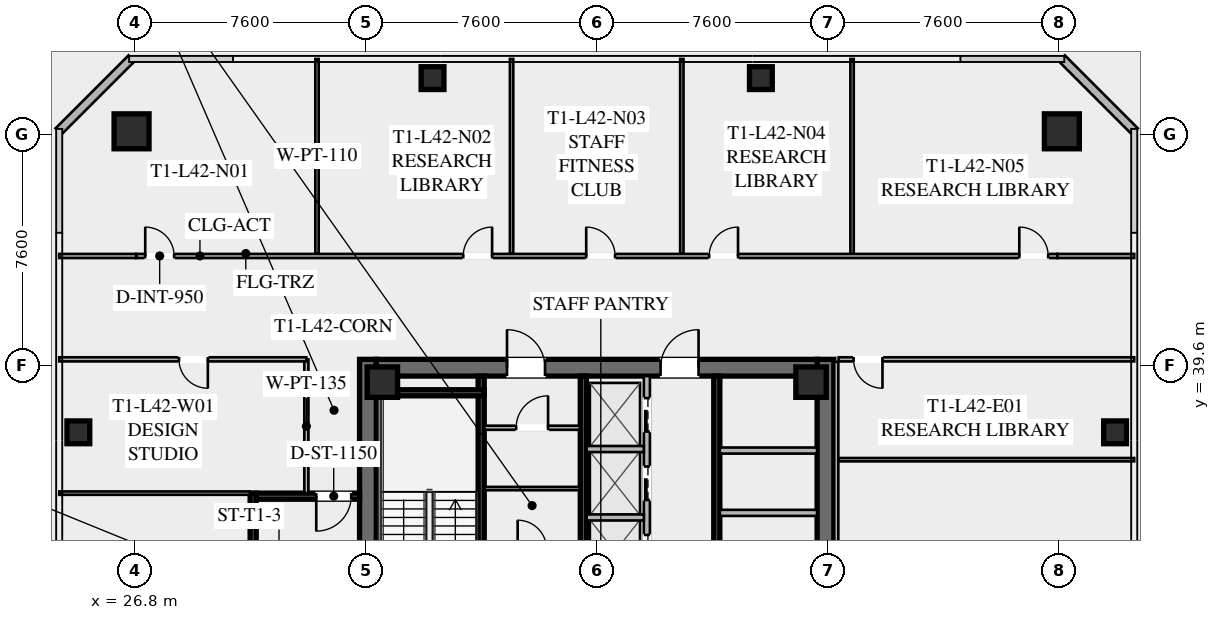
"""IFC4 building model, lengths in metres.
Left out: names, types, materials, properties, quantities, classifications, styles, units other than length and angle.
Written with IfcOpenShell. Run it as: python <this file> out.ifc"""

import sys

from ifc_helpers import new_model, si_unit, direction, frame, frame_2d, origin, origin_2d, place, context, subcontext, project, spatial, rectangle, hollow_rectangle, extrude, element, fill, save


model = new_model("IFC4")
c1 = context("Model", 3, precision=1e-05, world=origin(), true_north=direction((0.0, 1.0)))
c2 = subcontext(c1, "Body", "Model", "MODEL_VIEW")
j1 = project(units=[si_unit("LENGTHUNIT", "METRE"), si_unit("PLANEANGLEUNIT", "RADIAN")], contexts=[c1])
p1 = place(None, origin())
s1 = spatial("IfcSite", under=j1, at=p1, CompositionType="ELEMENT")
p2 = place(p1, origin())
s2 = spatial("IfcBuilding", under=s1, at=p2, CompositionType="ELEMENT")
p3 = place(p2, frame((0.0, 0.0, 157.0)))
s3 = spatial("IfcBuildingStorey", under=s2, at=p3, CompositionType="ELEMENT", Elevation=157.0)
for number, where, z_axis, x_axis in (
    (1, (34.475, 24.2, 0.0), (0.0, 0.0, 1.0), (0.0, 1.0, 0.0)),
    (2, (49.525, 39.8, 0.0), (0.0, 0.0, 1.0), (0.0, -1.0, 0.0)),
):
    element("IfcWall", number, at=place(p3, frame(where, z_axis=z_axis, x_axis=x_axis)), inside=s3, PredefinedType="SHEAR", context=c2, shape_type="SweptSolid", body=[
        extrude(rectangle(XDim=15.6, YDim=0.55, at=frame_2d((7.8, 0.0))), origin(), (0.0, 0.0, 1.0), 3.55),
    ])
p4 = place(p3, frame((34.75, 39.525, 0.0), z_axis=(0.0, 0.0, 1.0), x_axis=(1.0, 0.0, 0.0)))
e3 = element("IfcWall", 3, at=p4, inside=s3, PredefinedType="SHEAR", context=c2, shape_type="SweptSolid", body=[
    extrude(rectangle(XDim=14.5, YDim=0.55, at=frame_2d((7.25, 0.0))), origin(), (0.0, 0.0, 1.0), 3.55),
])
p5 = place(p4, frame((4.3, 0.0, 0.0)))
e4 = element("IfcOpeningElement", 4, at=p5, cuts=e3, PredefinedType="OPENING", context=c2, shape_type="SweptSolid", body=[
    extrude(rectangle(XDim=1.25, YDim=2.25, at=frame_2d((0.625, 1.125))), frame((0.0, 0.285, 0.0), z_axis=(0.0, -1.0, 0.0), x_axis=(1.0, 0.0, 0.0)), (0.0, 0.0, 1.0), 0.57),
])
p6 = place(p4, frame((9.35, 0.0, 0.0)))
e5 = element("IfcOpeningElement", 5, at=p6, cuts=e3, PredefinedType="OPENING", context=c2, shape_type="SweptSolid", body=[
    extrude(rectangle(XDim=1.25, YDim=2.25, at=frame_2d((0.625, 1.125))), frame((0.0, 0.285, 0.0), z_axis=(0.0, -1.0, 0.0), x_axis=(1.0, 0.0, 0.0)), (0.0, 0.0, 1.0), 0.57),
])
for number, where, z_axis, x_axis in (
    (6, (49.05, 39.05, 0.0), (0.0, 0.0, 1.0), (1.0, 0.0, 0.0)),
    (7, (34.95, 39.05, 0.0), (0.0, 0.0, 1.0), (1.0, 0.0, 0.0)),
):
    element("IfcColumn", number, at=place(p3, frame(where, z_axis=z_axis, x_axis=x_axis)), inside=s3, PredefinedType="COLUMN", context=c2, shape_type="SweptSolid", body=[
        extrude(hollow_rectangle(XDim=1.0, YDim=1.0, WallThickness=0.04, at=origin_2d()), origin(), (0.0, 0.0, 1.0), 3.37),
    ])
for number, where, z_axis, x_axis in (
    (8, (57.3, 47.3, -0.175), (0.0, 0.0, 1.0), (1.0, 0.0, 0.0)),
    (9, (26.7, 47.3, -0.175), (0.0, 0.0, 1.0), (1.0, 0.0, 0.0)),
):
    element("IfcColumn", number, at=place(p3, frame(where, z_axis=z_axis, x_axis=x_axis)), inside=s3, PredefinedType="COLUMN", context=c2, shape_type="SweptSolid", body=[
        extrude(hollow_rectangle(XDim=1.15, YDim=1.15, WallThickness=0.045, at=origin_2d()), origin(), (0.0, 0.0, 1.0), 3.545),
    ])
for number, where, z_axis, x_axis in (
    (10, (59.05, 37.4, -0.175), (0.0, 0.0, 1.0), (1.0, 0.0, 0.0)),
    (11, (47.4, 49.05, -0.175), (0.0, 0.0, 1.0), (1.0, 0.0, 0.0)),
    (12, (36.6, 49.05, -0.175), (0.0, 0.0, 1.0), (1.0, 0.0, 0.0)),
    (13, (24.95, 37.4, -0.175), (0.0, 0.0, 1.0), (1.0, 0.0, 0.0)),
):
    element("IfcColumn", number, at=place(p3, frame(where, z_axis=z_axis, x_axis=x_axis)), inside=s3, PredefinedType="COLUMN", context=c2, shape_type="SweptSolid", body=[
        extrude(hollow_rectangle(XDim=0.75, YDim=0.75, WallThickness=0.032, at=origin_2d()), origin(), (0.0, 0.0, 1.0), 3.545),
    ])
for number, where, z_axis, x_axis in (
    (14, (24.3, 47.3, 0.0), (0.0, 0.0, 1.0), (0.707, 0.707, 0.0)),
    (15, (57.3, 49.7, 0.0), (0.0, 0.0, 1.0), (0.707, -0.707, 0.0)),
):
    element("IfcWall", number, at=place(p3, frame(where, z_axis=z_axis, x_axis=x_axis)), inside=s3, PredefinedType="SOLIDWALL", context=c2, shape_type="SweptSolid", body=[
        extrude(rectangle(XDim=3.394, YDim=0.28, at=frame_2d((1.697, 0.0))), origin(), (0.0, 0.0, 1.0), 3.37),
    ])
p7 = place(p3, frame((38.2, 31.2, 0.0), z_axis=(0.0, 0.0, 1.0), x_axis=(0.0, 1.0, 0.0)))
e16 = element("IfcWall", 16, at=p7, inside=s3, PredefinedType="SHEAR", context=c2, shape_type="SweptSolid", body=[
    extrude(rectangle(XDim=8.05, YDim=0.2, at=frame_2d((4.025, 0.0))), origin(), (0.0, 0.0, 1.0), 3.37),
])
p8 = place(p7, frame((0.45, 0.0, 0.0)))
e17 = element("IfcOpeningElement", 17, at=p8, cuts=e16, PredefinedType="OPENING", context=c2, shape_type="SweptSolid", body=[
    extrude(rectangle(XDim=1.15, YDim=2.2, at=frame_2d((0.575, 1.1))), frame((0.0, 0.11, 0.0), z_axis=(0.0, -1.0, 0.0), x_axis=(1.0, 0.0, 0.0)), (0.0, 0.0, 1.0), 0.22),
])
p9 = place(p3, frame((34.75, 38.7, 0.0), z_axis=(0.0, 0.0, 1.0), x_axis=(1.0, 0.0, 0.0)))
e18 = element("IfcWall", 18, at=p9, inside=s3, PredefinedType="SHEAR", context=c2, shape_type="SweptSolid", body=[
    extrude(rectangle(XDim=3.55, YDim=0.2, at=frame_2d((1.775, 0.0))), origin(), (0.0, 0.0, 1.0), 3.37),
])
p10 = place(p3, frame((41.56, 24.75, 0.0), z_axis=(0.0, 0.0, 1.0), x_axis=(0.0, 1.0, 0.0)))
e19 = element("IfcWall", 19, at=p10, inside=s3, PredefinedType="SHEAR", context=c2, shape_type="SweptSolid", body=[
    extrude(rectangle(XDim=14.5, YDim=0.2, at=frame_2d((7.25, 0.0))), origin(), (0.0, 0.0, 1.0), 3.37),
])
p11 = place(p3, frame((45.95, 39.25, 0.0), z_axis=(0.0, 0.0, 1.0), x_axis=(0.0, -1.0, 0.0)))
e20 = element("IfcWall", 20, at=p11, inside=s3, PredefinedType="SHEAR", context=c2, shape_type="SweptSolid", body=[
    extrude(rectangle(XDim=6.45, YDim=0.2, at=frame_2d((3.225, 0.0))), origin(), (0.0, 0.0, 1.0), 3.37),
])
for number, where, z_axis, x_axis in (
    (21, (46.05, 34.75, 0.0), (0.0, 0.0, 1.0), (1.0, 0.0, 0.0)),
    (22, (46.05, 36.8, 0.0), (0.0, 0.0, 1.0), (1.0, 0.0, 0.0)),
):
    element("IfcWall", number, at=place(p3, frame(where, z_axis=z_axis, x_axis=x_axis)), inside=s3, PredefinedType="SOLIDWALL", context=c2, shape_type="SweptSolid", body=[
        extrude(rectangle(XDim=3.2, YDim=0.2, at=frame_2d((1.6, 0.0))), origin(), (0.0, 0.0, 1.0), 3.37),
    ])
p12 = place(p3, frame((38.3, 37.55, 0.0), z_axis=(0.0, 0.0, 1.0), x_axis=(1.0, 0.0, 0.0)))
e23 = element("IfcWall", 23, at=p12, inside=s3, PredefinedType="PARTITIONING", context=c2, shape_type="SweptSolid", body=[
    extrude(rectangle(XDim=3.15, YDim=0.135, at=frame_2d((1.575, 0.0))), origin(), (0.0, 0.0, 1.0), 2.723),
])
p13 = place(p12, frame((1.05, 0.0, 0.0)))
e24 = element("IfcOpeningElement", 24, at=p13, cuts=e23, PredefinedType="OPENING", context=c2, shape_type="SweptSolid", body=[
    extrude(rectangle(XDim=1.05, YDim=2.2, at=frame_2d((0.525, 1.1))), frame((0.0, 0.077, 0.0), z_axis=(0.0, -1.0, 0.0), x_axis=(1.0, 0.0, 0.0)), (0.0, 0.0, 1.0), 0.155),
])
p14 = place(p3, frame((38.3, 35.55, 0.0), z_axis=(0.0, 0.0, 1.0), x_axis=(1.0, 0.0, 0.0)))
e25 = element("IfcWall", 25, at=p14, inside=s3, PredefinedType="PARTITIONING", context=c2, shape_type="SweptSolid", body=[
    extrude(rectangle(XDim=3.15, YDim=0.11, at=frame_2d((1.575, 0.0))), origin(), (0.0, 0.0, 1.0), 2.723),
])
p15 = place(p3, frame((43.65, 32.35, 0.0), z_axis=(0.0, 0.0, 1.0), x_axis=(0.0, 1.0, 0.0)))
e26 = element("IfcWall", 26, at=p15, inside=s3, PredefinedType="SOLIDWALL", context=c2, shape_type="SweptSolid", body=[
    extrude(rectangle(XDim=6.9, YDim=0.2, at=frame_2d((3.45, 0.0))), origin(), (0.0, 0.0, 1.0), 3.37),
])
p16 = place(p15, frame((0.575, 0.0, 0.0)))
e27 = element("IfcOpeningElement", 27, at=p16, cuts=e26, PredefinedType="OPENING", context=c2, shape_type="SweptSolid", body=[
    extrude(rectangle(XDim=1.1, YDim=2.2, at=frame_2d((0.55, 1.1))), frame((0.0, 0.11, 0.0), z_axis=(0.0, -1.0, 0.0), x_axis=(1.0, 0.0, 0.0)), (0.0, 0.0, 1.0), 0.22),
])
p17 = place(p15, frame((2.825, 0.0, 0.0)))
e28 = element("IfcOpeningElement", 28, at=p17, cuts=e26, PredefinedType="OPENING", context=c2, shape_type="SweptSolid", body=[
    extrude(rectangle(XDim=1.1, YDim=2.2, at=frame_2d((0.55, 1.1))), frame((0.0, 0.11, 0.0), z_axis=(0.0, -1.0, 0.0), x_axis=(1.0, 0.0, 0.0)), (0.0, 0.0, 1.0), 0.22),
])
p18 = place(p15, frame((5.075, 0.0, 0.0)))
e29 = element("IfcOpeningElement", 29, at=p18, cuts=e26, PredefinedType="OPENING", context=c2, shape_type="SweptSolid", body=[
    extrude(rectangle(XDim=1.1, YDim=2.2, at=frame_2d((0.55, 1.1))), frame((0.0, 0.11, 0.0), z_axis=(0.0, -1.0, 0.0), x_axis=(1.0, 0.0, 0.0)), (0.0, 0.0, 1.0), 0.22),
])
for number, where, z_axis, x_axis in (
    (30, (41.67, 34.6, 0.0), (0.0, 0.0, 1.0), (1.0, 0.0, 0.0)),
    (31, (41.67, 36.85, 0.0), (0.0, 0.0, 1.0), (1.0, 0.0, 0.0)),
):
    element("IfcWall", number, at=place(p3, frame(where, z_axis=z_axis, x_axis=x_axis)), inside=s3, PredefinedType="SOLIDWALL", context=c2, shape_type="SweptSolid", body=[
        extrude(rectangle(XDim=1.88, YDim=0.2, at=frame_2d((0.94, 0.0))), origin(), (0.0, 0.0, 1.0), 3.37),
    ])
p19 = place(p3, frame((30.7, 28.6, 0.0), z_axis=(0.0, 0.0, 1.0), x_axis=(0.0, 1.0, 0.0)))
e32 = element("IfcWall", 32, at=p19, inside=s3, PredefinedType="SHEAR", context=c2, shape_type="SweptSolid", body=[
    extrude(rectangle(XDim=6.8, YDim=0.2, at=frame_2d((3.4, 0.0))), origin(), (0.0, 0.0, 1.0), 3.37),
])
p20 = place(p3, frame((34.2, 35.3, 0.0), z_axis=(0.0, 0.0, 1.0), x_axis=(-1.0, 0.0, 0.0)))
e33 = element("IfcWall", 33, at=p20, inside=s3, PredefinedType="SHEAR", context=c2, shape_type="SweptSolid", body=[
    extrude(rectangle(XDim=3.4, YDim=0.2, at=frame_2d((1.7, 0.0))), origin(), (0.0, 0.0, 1.0), 3.37),
])
p21 = place(p20, frame((0.275, 0.0, 0.0)))
e34 = element("IfcOpeningElement", 34, at=p21, cuts=e33, PredefinedType="OPENING", context=c2, shape_type="SweptSolid", body=[
    extrude(rectangle(XDim=1.15, YDim=2.2, at=frame_2d((0.575, 1.1))), frame((0.0, 0.11, 0.0), z_axis=(0.0, -1.0, 0.0), x_axis=(1.0, 0.0, 0.0)), (0.0, 0.0, 1.0), 0.22),
])
p22 = place(p3, frame((32.45, 35.4, 0.0), z_axis=(0.0, 0.0, 1.0), x_axis=(0.0, 1.0, 0.0)))
e35 = element("IfcWall", 35, at=p22, inside=s3, PredefinedType="PARTITIONING", context=c2, shape_type="SweptSolid", body=[
    extrude(rectangle(XDim=4.4, YDim=0.135, at=frame_2d((2.2, 0.0))), origin(), (0.0, 0.0, 1.0), 2.723),
])
p23 = place(p3, frame((26.85, 43.2, 0.0), z_axis=(0.0, 0.0, 1.0), x_axis=(1.0, 0.0, 0.0)))
e36 = element("IfcWall", 36, at=p23, inside=s3, PredefinedType="PARTITIONING", context=c2, shape_type="SweptSolid", body=[
    extrude(rectangle(XDim=30.3, YDim=0.135, at=frame_2d((15.15, 0.0))), origin(), (0.0, 0.0, 1.0), 2.723),
])
p24 = place(p23, frame((0.3, 0.0, 0.0)))
e37 = element("IfcOpeningElement", 37, at=p24, cuts=e36, PredefinedType="OPENING", context=c2, shape_type="SweptSolid", body=[
    extrude(rectangle(XDim=0.95, YDim=2.05, at=frame_2d((0.475, 1.025))), frame((0.0, 0.077, 0.0), z_axis=(0.0, -1.0, 0.0), x_axis=(1.0, 0.0, 0.0)), (0.0, 0.0, 1.0), 0.155),
])
p25 = place(p23, frame((10.76, 0.0, 0.0)))
e38 = element("IfcOpeningElement", 38, at=p25, cuts=e36, PredefinedType="OPENING", context=c2, shape_type="SweptSolid", body=[
    extrude(rectangle(XDim=0.95, YDim=2.05, at=frame_2d((0.475, 1.025))), frame((0.0, 0.077, 0.0), z_axis=(0.0, -1.0, 0.0), x_axis=(1.0, 0.0, 0.0)), (0.0, 0.0, 1.0), 0.155),
])
p26 = place(p23, frame((14.805, 0.0, 0.0)))
e39 = element("IfcOpeningElement", 39, at=p26, cuts=e36, PredefinedType="OPENING", context=c2, shape_type="SweptSolid", body=[
    extrude(rectangle(XDim=0.95, YDim=2.05, at=frame_2d((0.475, 1.025))), frame((0.0, 0.077, 0.0), z_axis=(0.0, -1.0, 0.0), x_axis=(1.0, 0.0, 0.0)), (0.0, 0.0, 1.0), 0.155),
])
p27 = place(p23, frame((18.849, 0.0, 0.0)))
e40 = element("IfcOpeningElement", 40, at=p27, cuts=e36, PredefinedType="OPENING", context=c2, shape_type="SweptSolid", body=[
    extrude(rectangle(XDim=0.95, YDim=2.05, at=frame_2d((0.475, 1.025))), frame((0.0, 0.077, 0.0), z_axis=(0.0, -1.0, 0.0), x_axis=(1.0, 0.0, 0.0)), (0.0, 0.0, 1.0), 0.155),
])
p28 = place(p23, frame((29.05, 0.0, 0.0)))
e41 = element("IfcOpeningElement", 41, at=p28, cuts=e36, PredefinedType="OPENING", context=c2, shape_type="SweptSolid", body=[
    extrude(rectangle(XDim=0.95, YDim=2.05, at=frame_2d((0.475, 1.025))), frame((0.0, 0.077, 0.0), z_axis=(0.0, -1.0, 0.0), x_axis=(1.0, 0.0, 0.0)), (0.0, 0.0, 1.0), 0.155),
])
for number, where, z_axis, x_axis in (
    (42, (24.32, 43.2, 0.0), (0.0, 0.0, 1.0), (1.0, 0.0, 0.0)),
    (43, (57.15, 43.2, 0.0), (0.0, 0.0, 1.0), (1.0, 0.0, 0.0)),
):
    element("IfcWall", number, at=place(p3, frame(where, z_axis=z_axis, x_axis=x_axis)), inside=s3, PredefinedType="PARTITIONING", context=c2, shape_type="SweptSolid", body=[
        extrude(rectangle(XDim=2.53, YDim=0.135, at=frame_2d((1.265, 0.0))), origin(), (0.0, 0.0, 1.0), 2.723),
    ])
for number, where, z_axis, x_axis in (
    (44, (32.8, 43.28, 0.0), (0.0, 0.0, 1.0), (0.0, 1.0, 0.0)),
    (45, (39.2, 43.28, 0.0), (0.0, 0.0, 1.0), (0.0, 1.0, 0.0)),
    (46, (44.8, 43.28, 0.0), (0.0, 0.0, 1.0), (0.0, 1.0, 0.0)),
    (47, (50.4, 43.28, 0.0), (0.0, 0.0, 1.0), (0.0, 1.0, 0.0)),
):
    element("IfcWall", number, at=place(p3, frame(where, z_axis=z_axis, x_axis=x_axis)), inside=s3, PredefinedType="PARTITIONING", context=c2, shape_type="SweptSolid", body=[
        extrude(rectangle(XDim=6.4, YDim=0.11, at=frame_2d((3.2, 0.0))), origin(), (0.0, 0.0, 1.0), 2.723),
    ])
p29 = place(p3, frame((49.88, 39.72, 0.0), z_axis=(0.0, 0.0, 1.0), x_axis=(0.0, -1.0, 0.0)))
e48 = element("IfcWall", 48, at=p29, inside=s3, PredefinedType="PARTITIONING", context=c2, shape_type="SweptSolid", body=[
    extrude(rectangle(XDim=15.44, YDim=0.135, at=frame_2d((7.72, 0.0))), origin(), (0.0, 0.0, 1.0), 2.723),
])
p30 = place(p3, frame((59.68, 39.8, 0.0), z_axis=(0.0, 0.0, 1.0), x_axis=(-1.0, 0.0, 0.0)))
e49 = element("IfcWall", 49, at=p30, inside=s3, PredefinedType="PARTITIONING", context=c2, shape_type="SweptSolid", body=[
    extrude(rectangle(XDim=9.72, YDim=0.135, at=frame_2d((4.86, 0.0))), origin(), (0.0, 0.0, 1.0), 2.723),
])
p31 = place(p30, frame((8.28, 0.0, 0.0)))
e50 = element("IfcOpeningElement", 50, at=p31, cuts=e49, PredefinedType="OPENING", context=c2, shape_type="SweptSolid", body=[
    extrude(rectangle(XDim=0.95, YDim=2.05, at=frame_2d((0.475, 1.025))), frame((0.0, 0.077, 0.0), z_axis=(0.0, -1.0, 0.0), x_axis=(1.0, 0.0, 0.0)), (0.0, 0.0, 1.0), 0.155),
])
p32 = place(p3, frame((49.96, 36.5, 0.0), z_axis=(0.0, 0.0, 1.0), x_axis=(1.0, 0.0, 0.0)))
e51 = element("IfcWall", 51, at=p32, inside=s3, PredefinedType="PARTITIONING", context=c2, shape_type="SweptSolid", body=[
    extrude(rectangle(XDim=9.72, YDim=0.11, at=frame_2d((4.86, 0.0))), origin(), (0.0, 0.0, 1.0), 2.723),
])
p33 = place(p3, frame((32.45, 39.8, 0.0), z_axis=(0.0, 0.0, 1.0), x_axis=(-1.0, 0.0, 0.0)))
e52 = element("IfcWall", 52, at=p33, inside=s3, PredefinedType="PARTITIONING", context=c2, shape_type="SweptSolid", body=[
    extrude(rectangle(XDim=8.13, YDim=0.135, at=frame_2d((4.065, 0.0))), origin(), (0.0, 0.0, 1.0), 2.723),
])
p34 = place(p33, frame((3.24, 0.0, 0.0)))
e53 = element("IfcOpeningElement", 53, at=p34, cuts=e52, PredefinedType="OPENING", context=c2, shape_type="SweptSolid", body=[
    extrude(rectangle(XDim=0.95, YDim=2.05, at=frame_2d((0.475, 1.025))), frame((0.0, 0.077, 0.0), z_axis=(0.0, -1.0, 0.0), x_axis=(1.0, 0.0, 0.0)), (0.0, 0.0, 1.0), 0.155),
])
p35 = place(p3, frame((30.6, 35.4, 0.0), z_axis=(0.0, 0.0, 1.0), x_axis=(-1.0, 0.0, 0.0)))
e54 = element("IfcWall", 54, at=p35, inside=s3, PredefinedType="PARTITIONING", context=c2, shape_type="SweptSolid", body=[
    extrude(rectangle(XDim=6.28, YDim=0.11, at=frame_2d((3.14, 0.0))), origin(), (0.0, 0.0, 1.0), 2.723),
])
p36 = place(p5, origin())
e55 = element("IfcDoor", 55, at=p36, inside=s3, OperationType="SINGLE_SWING_LEFT", PredefinedType="DOOR", context=c2, shape_type="SweptSolid", body=[
    extrude(rectangle(XDim=1.25, YDim=2.25, at=frame_2d((0.625, 1.125))), frame((0.0, 0.025, 0.0), z_axis=(0.0, -1.0, 0.0), x_axis=(1.0, 0.0, 0.0)), (0.0, 0.0, 1.0), 0.05),
])
fill(e4, e55)
p37 = place(p6, origin())
e56 = element("IfcDoor", 56, at=p37, inside=s3, OperationType="SINGLE_SWING_RIGHT", PredefinedType="DOOR", context=c2, shape_type="SweptSolid", body=[
    extrude(rectangle(XDim=1.25, YDim=2.25, at=frame_2d((0.625, 1.125))), frame((0.0, 0.025, 0.0), z_axis=(0.0, -1.0, 0.0), x_axis=(1.0, 0.0, 0.0)), (0.0, 0.0, 1.0), 0.05),
])
fill(e5, e56)
p38 = place(p13, origin())
e57 = element("IfcDoor", 57, at=p38, inside=s3, OperationType="SINGLE_SWING_RIGHT", PredefinedType="DOOR", context=c2, shape_type="SweptSolid", body=[
    extrude(rectangle(XDim=1.05, YDim=2.2, at=frame_2d((0.525, 1.1))), frame((0.0, 0.025, 0.0), z_axis=(0.0, -1.0, 0.0), x_axis=(1.0, 0.0, 0.0)), (0.0, 0.0, 1.0), 0.05),
])
fill(e24, e57)
p39 = place(p21, origin())
e58 = element("IfcDoor", 58, at=p39, inside=s3, OperationType="SINGLE_SWING_RIGHT", PredefinedType="DOOR", context=c2, shape_type="SweptSolid", body=[
    extrude(rectangle(XDim=1.15, YDim=2.2, at=frame_2d((0.575, 1.1))), frame((0.0, 0.025, 0.0), z_axis=(0.0, -1.0, 0.0), x_axis=(1.0, 0.0, 0.0)), (0.0, 0.0, 1.0), 0.05),
])
fill(e34, e58)
p40 = place(p24, origin())
e59 = element("IfcDoor", 59, at=p40, inside=s3, OperationType="SINGLE_SWING_LEFT", PredefinedType="DOOR", context=c2, shape_type="SweptSolid", body=[
    extrude(rectangle(XDim=0.95, YDim=2.05, at=frame_2d((0.475, 1.025))), frame((0.0, 0.025, 0.0), z_axis=(0.0, -1.0, 0.0), x_axis=(1.0, 0.0, 0.0)), (0.0, 0.0, 1.0), 0.05),
])
fill(e37, e59)
p41 = place(p25, origin())
e60 = element("IfcDoor", 60, at=p41, inside=s3, OperationType="SINGLE_SWING_RIGHT", PredefinedType="DOOR", context=c2, shape_type="SweptSolid", body=[
    extrude(rectangle(XDim=0.95, YDim=2.05, at=frame_2d((0.475, 1.025))), frame((0.0, 0.025, 0.0), z_axis=(0.0, -1.0, 0.0), x_axis=(1.0, 0.0, 0.0)), (0.0, 0.0, 1.0), 0.05),
])
fill(e38, e60)
p42 = place(p26, origin())
e61 = element("IfcDoor", 61, at=p42, inside=s3, OperationType="SINGLE_SWING_LEFT", PredefinedType="DOOR", context=c2, shape_type="SweptSolid", body=[
    extrude(rectangle(XDim=0.95, YDim=2.05, at=frame_2d((0.475, 1.025))), frame((0.0, 0.025, 0.0), z_axis=(0.0, -1.0, 0.0), x_axis=(1.0, 0.0, 0.0)), (0.0, 0.0, 1.0), 0.05),
])
fill(e39, e61)
p43 = place(p27, origin())
e62 = element("IfcDoor", 62, at=p43, inside=s3, OperationType="SINGLE_SWING_RIGHT", PredefinedType="DOOR", context=c2, shape_type="SweptSolid", body=[
    extrude(rectangle(XDim=0.95, YDim=2.05, at=frame_2d((0.475, 1.025))), frame((0.0, 0.025, 0.0), z_axis=(0.0, -1.0, 0.0), x_axis=(1.0, 0.0, 0.0)), (0.0, 0.0, 1.0), 0.05),
])
fill(e40, e62)
p44 = place(p28, origin())
e63 = element("IfcDoor", 63, at=p44, inside=s3, OperationType="SINGLE_SWING_LEFT", PredefinedType="DOOR", context=c2, shape_type="SweptSolid", body=[
    extrude(rectangle(XDim=0.95, YDim=2.05, at=frame_2d((0.475, 1.025))), frame((0.0, 0.025, 0.0), z_axis=(0.0, -1.0, 0.0), x_axis=(1.0, 0.0, 0.0)), (0.0, 0.0, 1.0), 0.05),
])
fill(e41, e63)
p45 = place(p31, origin())
e64 = element("IfcDoor", 64, at=p45, inside=s3, OperationType="SINGLE_SWING_LEFT", PredefinedType="DOOR", context=c2, shape_type="SweptSolid", body=[
    extrude(rectangle(XDim=0.95, YDim=2.05, at=frame_2d((0.475, 1.025))), frame((0.0, 0.025, 0.0), z_axis=(0.0, -1.0, 0.0), x_axis=(1.0, 0.0, 0.0)), (0.0, 0.0, 1.0), 0.05),
])
fill(e50, e64)
p46 = place(p34, origin())
e65 = element("IfcDoor", 65, at=p46, inside=s3, OperationType="SINGLE_SWING_LEFT", PredefinedType="DOOR", context=c2, shape_type="SweptSolid", body=[
    extrude(rectangle(XDim=0.95, YDim=2.05, at=frame_2d((0.475, 1.025))), frame((0.0, 0.025, 0.0), z_axis=(0.0, -1.0, 0.0), x_axis=(1.0, 0.0, 0.0)), (0.0, 0.0, 1.0), 0.05),
])
fill(e53, e65)
p47 = place(p16, origin())
e66 = element("IfcDoor", 66, at=p47, inside=s3, OperationType="SLIDING_TO_LEFT", PredefinedType="DOOR", context=c2, shape_type="SweptSolid", body=[
    extrude(rectangle(XDim=1.1, YDim=2.2, at=frame_2d((0.55, 1.1))), frame((0.0, 0.025, 0.0), z_axis=(0.0, -1.0, 0.0), x_axis=(1.0, 0.0, 0.0)), (0.0, 0.0, 1.0), 0.05),
])
fill(e27, e66)
p48 = place(p17, origin())
e67 = element("IfcDoor", 67, at=p48, inside=s3, OperationType="SLIDING_TO_LEFT", PredefinedType="DOOR", context=c2, shape_type="SweptSolid", body=[
    extrude(rectangle(XDim=1.1, YDim=2.2, at=frame_2d((0.55, 1.1))), frame((0.0, 0.025, 0.0), z_axis=(0.0, -1.0, 0.0), x_axis=(1.0, 0.0, 0.0)), (0.0, 0.0, 1.0), 0.05),
])
fill(e28, e67)
p49 = place(p18, origin())
e68 = element("IfcDoor", 68, at=p49, inside=s3, OperationType="SLIDING_TO_LEFT", PredefinedType="DOOR", context=c2, shape_type="SweptSolid", body=[
    extrude(rectangle(XDim=1.1, YDim=2.2, at=frame_2d((0.55, 1.1))), frame((0.0, 0.025, 0.0), z_axis=(0.0, -1.0, 0.0), x_axis=(1.0, 0.0, 0.0)), (0.0, 0.0, 1.0), 0.05),
])
fill(e29, e68)
save(model, sys.argv[1])
